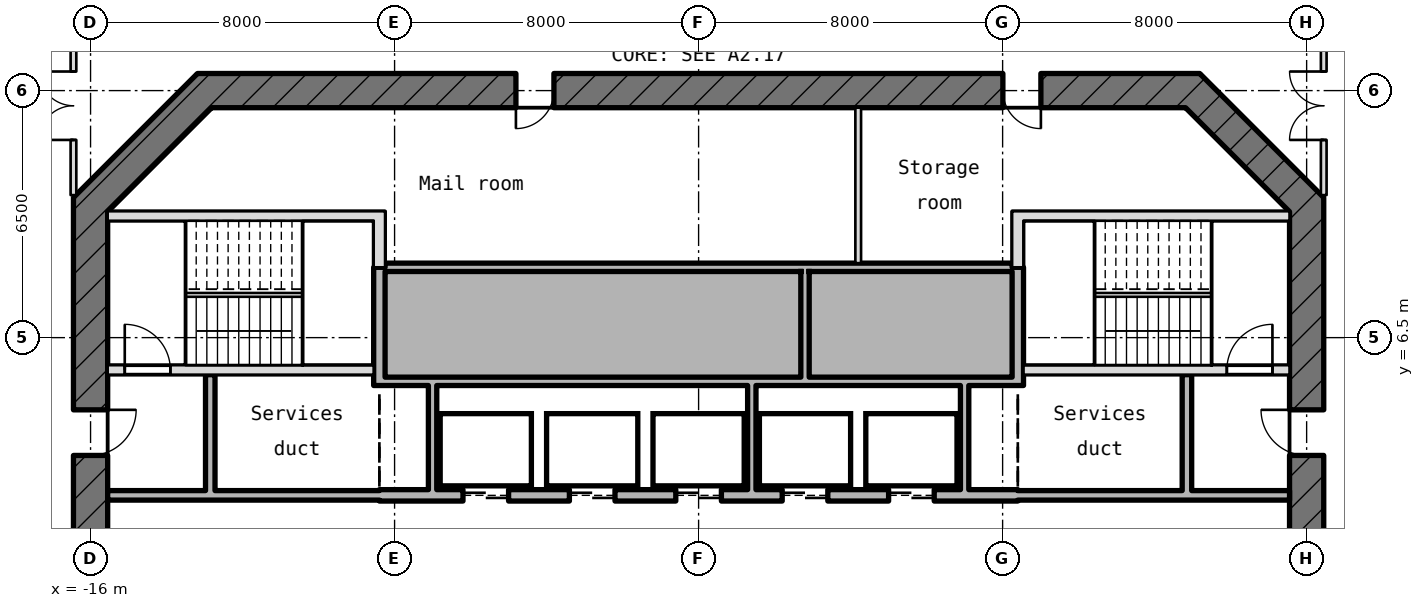
"""IFC4 building model, lengths in metres.
Left out: names, types, materials, properties, quantities, classifications, styles, units other than length and angle.
Written with IfcOpenShell. Run it as: python <this file> out.ifc"""

import sys

from ifc_helpers import new_model, si_unit, direction, frame, frame_2d, origin, place, context, subcontext, project, spatial, rectangle, extrude, element, fill, save


model = new_model("IFC4")
c1 = context("Model", 3, precision=1e-05, world=origin(), true_north=direction((0.0, 1.0)))
c2 = subcontext(c1, "Body", "Model", "MODEL_VIEW")
j1 = project(units=[si_unit("LENGTHUNIT", "METRE"), si_unit("PLANEANGLEUNIT", "RADIAN")], contexts=[c1])
p1 = place(None, origin())
s1 = spatial("IfcSite", under=j1, at=p1, CompositionType="ELEMENT")
p2 = place(p1, origin())
s2 = spatial("IfcBuilding", under=s1, at=p2, CompositionType="ELEMENT")
p3 = place(p2, frame((0.0, 0.0, 173.5)))
s3 = spatial("IfcBuildingStorey", under=s2, at=p3, CompositionType="ELEMENT", Elevation=173.5)
p4 = place(p3, frame((16.0, -10.186, -0.18), z_axis=(0.0, 0.0, 1.0), x_axis=(0.0, 1.0, 0.0)))
e1 = element("IfcWall", 1, at=p4, inside=s3, PredefinedType="SHEAR", context=c2, shape_type="SweptSolid", body=[
    extrude(rectangle(XDim=20.373, YDim=0.9, at=frame_2d((10.186, 0.0))), origin(), (0.0, 0.0, 1.0), 4.15),
])
p5 = place(p4, frame((8.986, 0.0, 0.18)))
e2 = element("IfcOpeningElement", 2, at=p5, cuts=e1, PredefinedType="OPENING", context=c2, shape_type="SweptSolid", body=[
    extrude(rectangle(XDim=2.4, YDim=2.1, at=frame_2d((1.2, 1.05))), frame((0.0, 0.46, 0.0), z_axis=(0.0, -1.0, 0.0), x_axis=(1.0, 0.0, 0.0)), (0.0, 0.0, 1.0), 0.92),
])
p6 = place(p4, frame((13.586, 0.0, 0.18)))
e3 = element("IfcOpeningElement", 3, at=p6, cuts=e1, PredefinedType="OPENING", context=c2, shape_type="SweptSolid", body=[
    extrude(rectangle(XDim=1.2, YDim=2.1, at=frame_2d((0.6, 1.05))), frame((0.0, 0.46, 0.0), z_axis=(0.0, -1.0, 0.0), x_axis=(1.0, 0.0, 0.0)), (0.0, 0.0, 1.0), 0.92),
])
p7 = place(p4, frame((2.4, 0.0, 0.18)))
e4 = element("IfcOpeningElement", 4, at=p7, cuts=e1, PredefinedType="OPENING", context=c2, shape_type="SweptSolid", body=[
    extrude(rectangle(XDim=1.2, YDim=2.1, at=frame_2d((0.6, 1.05))), frame((0.0, 0.46, 0.0), z_axis=(0.0, -1.0, 0.0), x_axis=(1.0, 0.0, 0.0)), (0.0, 0.0, 1.0), 0.92),
])
p8 = place(p3, frame((16.132, 9.868, -0.18), z_axis=(0.0, 0.0, 1.0), x_axis=(-0.707106781187, 0.707106781187, 0.0)))
e5 = element("IfcWall", 5, at=p8, inside=s3, PredefinedType="SHEAR", context=c2, shape_type="SweptSolid", body=[
    extrude(rectangle(XDim=4.615, YDim=0.9, at=frame_2d((2.308, 0.0))), origin(), (0.0, 0.0, 1.0), 4.15),
])
p9 = place(p3, frame((13.186, 13.0, -0.18), z_axis=(0.0, 0.0, 1.0), x_axis=(-1.0, 0.0, 0.0)))
e6 = element("IfcWall", 6, at=p9, inside=s3, PredefinedType="SHEAR", context=c2, shape_type="SweptSolid", body=[
    extrude(rectangle(XDim=26.373, YDim=0.9, at=frame_2d((13.186, 0.0))), origin(), (0.0, 0.0, 1.0), 4.15),
])
p10 = place(p9, frame((16.993, 0.0, 0.18)))
e7 = element("IfcOpeningElement", 7, at=p10, cuts=e6, PredefinedType="OPENING", context=c2, shape_type="SweptSolid", body=[
    extrude(rectangle(XDim=1.0, YDim=2.1, at=frame_2d((0.5, 1.05))), frame((0.0, 0.46, 0.0), z_axis=(0.0, -1.0, 0.0), x_axis=(1.0, 0.0, 0.0)), (0.0, 0.0, 1.0), 0.92),
])
p11 = place(p9, frame((4.179, 0.0, 0.18)))
e8 = element("IfcOpeningElement", 8, at=p11, cuts=e6, PredefinedType="OPENING", context=c2, shape_type="SweptSolid", body=[
    extrude(rectangle(XDim=1.0, YDim=2.1, at=frame_2d((0.5, 1.05))), frame((0.0, 0.46, 0.0), z_axis=(0.0, -1.0, 0.0), x_axis=(1.0, 0.0, 0.0)), (0.0, 0.0, 1.0), 0.92),
])
p12 = place(p3, frame((-12.868, 13.132, -0.18), z_axis=(0.0, 0.0, 1.0), x_axis=(-0.707106781187, -0.707106781187, 0.0)))
e9 = element("IfcWall", 9, at=p12, inside=s3, PredefinedType="SHEAR", context=c2, shape_type="SweptSolid", body=[
    extrude(rectangle(XDim=4.615, YDim=0.9, at=frame_2d((2.308, 0.0))), origin(), (0.0, 0.0, 1.0), 4.15),
])
p13 = place(p3, frame((-16.0, 10.186, -0.18), z_axis=(0.0, 0.0, 1.0), x_axis=(0.0, -1.0, 0.0)))
e10 = element("IfcWall", 10, at=p13, inside=s3, PredefinedType="SHEAR", context=c2, shape_type="SweptSolid", body=[
    extrude(rectangle(XDim=20.373, YDim=0.9, at=frame_2d((10.186, 0.0))), origin(), (0.0, 0.0, 1.0), 4.15),
])
p14 = place(p13, frame((8.986, 0.0, 0.18)))
e11 = element("IfcOpeningElement", 11, at=p14, cuts=e10, PredefinedType="OPENING", context=c2, shape_type="SweptSolid", body=[
    extrude(rectangle(XDim=2.4, YDim=2.1, at=frame_2d((1.2, 1.05))), frame((0.0, 0.46, 0.0), z_axis=(0.0, -1.0, 0.0), x_axis=(1.0, 0.0, 0.0)), (0.0, 0.0, 1.0), 0.92),
])
p15 = place(p13, frame((5.586, 0.0, 0.18)))
e12 = element("IfcOpeningElement", 12, at=p15, cuts=e10, PredefinedType="OPENING", context=c2, shape_type="SweptSolid", body=[
    extrude(rectangle(XDim=1.2, YDim=2.1, at=frame_2d((0.6, 1.05))), frame((0.0, 0.46, 0.0), z_axis=(0.0, -1.0, 0.0), x_axis=(1.0, 0.0, 0.0)), (0.0, 0.0, 1.0), 0.92),
])
p16 = place(p3, frame((-15.55, 2.35, 0.0), z_axis=(0.0, 0.0, 1.0), x_axis=(1.0, 0.0, 0.0)))
e13 = element("IfcWall", 13, at=p16, inside=s3, PredefinedType="STANDARD", context=c2, shape_type="SweptSolid", body=[
    extrude(rectangle(XDim=7.15, YDim=0.25, at=frame_2d((3.575, 0.0))), origin(), (0.0, 0.0, 1.0), 3.97),
])
p17 = place(p3, frame((-8.4, 2.35, -0.18), z_axis=(0.0, 0.0, 1.0), x_axis=(1.0, 0.0, 0.0)))
e14 = element("IfcWall", 14, at=p17, inside=s3, PredefinedType="SHEAR", context=c2, shape_type="SweptSolid", body=[
    extrude(rectangle(XDim=16.8, YDim=0.3, at=frame_2d((8.4, 0.0))), origin(), (0.0, 0.0, 1.0), 4.15),
])
p18 = place(p17, frame((2.2, 0.0, 0.18)))
e15 = element("IfcOpeningElement", 15, at=p18, cuts=e14, PredefinedType="OPENING", context=c2, shape_type="SweptSolid", body=[
    extrude(rectangle(XDim=1.2, YDim=2.1, at=frame_2d((0.6, 1.05))), frame((0.0, 0.16, 0.0), z_axis=(0.0, -1.0, 0.0), x_axis=(1.0, 0.0, 0.0)), (0.0, 0.0, 1.0), 0.32),
])
p19 = place(p17, frame((5.0, 0.0, 0.18)))
e16 = element("IfcOpeningElement", 16, at=p19, cuts=e14, PredefinedType="OPENING", context=c2, shape_type="SweptSolid", body=[
    extrude(rectangle(XDim=1.2, YDim=2.1, at=frame_2d((0.6, 1.05))), frame((0.0, 0.16, 0.0), z_axis=(0.0, -1.0, 0.0), x_axis=(1.0, 0.0, 0.0)), (0.0, 0.0, 1.0), 0.32),
])
p20 = place(p17, frame((7.8, 0.0, 0.18)))
e17 = element("IfcOpeningElement", 17, at=p20, cuts=e14, PredefinedType="OPENING", context=c2, shape_type="SweptSolid", body=[
    extrude(rectangle(XDim=1.2, YDim=2.1, at=frame_2d((0.6, 1.05))), frame((0.0, 0.16, 0.0), z_axis=(0.0, -1.0, 0.0), x_axis=(1.0, 0.0, 0.0)), (0.0, 0.0, 1.0), 0.32),
])
p21 = place(p17, frame((10.6, 0.0, 0.18)))
e18 = element("IfcOpeningElement", 18, at=p21, cuts=e14, PredefinedType="OPENING", context=c2, shape_type="SweptSolid", body=[
    extrude(rectangle(XDim=1.2, YDim=2.1, at=frame_2d((0.6, 1.05))), frame((0.0, 0.16, 0.0), z_axis=(0.0, -1.0, 0.0), x_axis=(1.0, 0.0, 0.0)), (0.0, 0.0, 1.0), 0.32),
])
p22 = place(p17, frame((13.4, 0.0, 0.18)))
e19 = element("IfcOpeningElement", 19, at=p22, cuts=e14, PredefinedType="OPENING", context=c2, shape_type="SweptSolid", body=[
    extrude(rectangle(XDim=1.2, YDim=2.1, at=frame_2d((0.6, 1.05))), frame((0.0, 0.16, 0.0), z_axis=(0.0, -1.0, 0.0), x_axis=(1.0, 0.0, 0.0)), (0.0, 0.0, 1.0), 0.32),
])
p23 = place(p3, frame((8.4, 2.35, 0.0), z_axis=(0.0, 0.0, 1.0), x_axis=(1.0, 0.0, 0.0)))
e20 = element("IfcWall", 20, at=p23, inside=s3, PredefinedType="STANDARD", context=c2, shape_type="SweptSolid", body=[
    extrude(rectangle(XDim=7.15, YDim=0.25, at=frame_2d((3.575, 0.0))), origin(), (0.0, 0.0, 1.0), 3.97),
])
p24 = place(p3, frame((-8.25, 5.35, 0.0), z_axis=(0.0, 0.0, 1.0), x_axis=(1.0, 0.0, 0.0)))
e21 = element("IfcWall", 21, at=p24, inside=s3, PredefinedType="STANDARD", context=c2, shape_type="SweptSolid", body=[
    extrude(rectangle(XDim=16.5, YDim=0.22, at=frame_2d((8.25, 0.0))), origin(), (0.0, 0.0, 1.0), 3.97),
])
p25 = place(p3, frame((-15.55, 5.65, -0.18), z_axis=(0.0, 0.0, 1.0), x_axis=(1.0, 0.0, 0.0)))
e22 = element("IfcWall", 22, at=p25, inside=s3, PredefinedType="SHEAR", context=c2, shape_type="SweptSolid", body=[
    extrude(rectangle(XDim=7.0, YDim=0.25, at=frame_2d((3.5, 0.0))), origin(), (0.0, 0.0, 1.0), 4.15),
])
p26 = place(p25, frame((0.45, 0.0, 0.18)))
e23 = element("IfcOpeningElement", 23, at=p26, cuts=e22, PredefinedType="OPENING", context=c2, shape_type="SweptSolid", body=[
    extrude(rectangle(XDim=1.2, YDim=2.1, at=frame_2d((0.6, 1.05))), frame((0.0, 0.135, 0.0), z_axis=(0.0, -1.0, 0.0), x_axis=(1.0, 0.0, 0.0)), (0.0, 0.0, 1.0), 0.27),
])
p27 = place(p3, frame((8.55, 5.65, -0.18), z_axis=(0.0, 0.0, 1.0), x_axis=(1.0, 0.0, 0.0)))
e24 = element("IfcWall", 24, at=p27, inside=s3, PredefinedType="SHEAR", context=c2, shape_type="SweptSolid", body=[
    extrude(rectangle(XDim=7.0, YDim=0.25, at=frame_2d((3.5, 0.0))), origin(), (0.0, 0.0, 1.0), 4.15),
])
p28 = place(p27, frame((5.35, 0.0, 0.18)))
e25 = element("IfcOpeningElement", 25, at=p28, cuts=e24, PredefinedType="OPENING", context=c2, shape_type="SweptSolid", body=[
    extrude(rectangle(XDim=1.2, YDim=2.1, at=frame_2d((0.6, 1.05))), frame((0.0, 0.135, 0.0), z_axis=(0.0, -1.0, 0.0), x_axis=(1.0, 0.0, 0.0)), (0.0, 0.0, 1.0), 0.27),
])
p29 = place(p3, frame((-8.25, 8.35, 0.0), z_axis=(0.0, 0.0, 1.0), x_axis=(1.0, 0.0, 0.0)))
e26 = element("IfcWall", 26, at=p29, inside=s3, PredefinedType="STANDARD", context=c2, shape_type="SweptSolid", body=[
    extrude(rectangle(XDim=16.5, YDim=0.22, at=frame_2d((8.25, 0.0))), origin(), (0.0, 0.0, 1.0), 3.97),
])
for number, where, z_axis, x_axis in (
    (27, (-15.55, 9.7, -0.18), (0.0, 0.0, 1.0), (1.0, 0.0, 0.0)),
    (28, (8.55, 9.7, -0.18), (0.0, 0.0, 1.0), (1.0, 0.0, 0.0)),
):
    element("IfcWall", number, at=place(p3, frame(where, z_axis=z_axis, x_axis=x_axis)), inside=s3, PredefinedType="SHEAR", context=c2, shape_type="SweptSolid", body=[
        extrude(rectangle(XDim=7.0, YDim=0.25, at=frame_2d((3.5, 0.0))), origin(), (0.0, 0.0, 1.0), 4.15),
    ])
p30 = place(p3, frame((-12.85, 2.475, 0.0), z_axis=(0.0, 0.0, 1.0), x_axis=(0.0, 1.0, 0.0)))
e29 = element("IfcWall", 29, at=p30, inside=s3, PredefinedType="STANDARD", context=c2, shape_type="SweptSolid", body=[
    extrude(rectangle(XDim=3.05, YDim=0.25, at=frame_2d((1.525, 0.0))), origin(), (0.0, 0.0, 1.0), 3.97),
])
p31 = place(p3, frame((-8.4, 5.24, -0.18), z_axis=(0.0, 0.0, 1.0), x_axis=(0.0, 1.0, 0.0)))
e30 = element("IfcWall", 30, at=p31, inside=s3, PredefinedType="SHEAR", context=c2, shape_type="SweptSolid", body=[
    extrude(rectangle(XDim=3.11, YDim=0.3, at=frame_2d((1.555, 0.0))), origin(), (0.0, 0.0, 1.0), 4.15),
])
p32 = place(p3, frame((-8.4, 8.35, -0.18), z_axis=(0.0, 0.0, 1.0), x_axis=(0.0, 1.0, 0.0)))
e31 = element("IfcWall", 31, at=p32, inside=s3, PredefinedType="SHEAR", context=c2, shape_type="SweptSolid", body=[
    extrude(rectangle(XDim=1.475, YDim=0.3, at=frame_2d((0.737, 0.0))), origin(), (0.0, 0.0, 1.0), 4.15),
])
for number, where, z_axis, x_axis in (
    (32, (-7.0, 2.5, 0.0), (0.0, 0.0, 1.0), (0.0, 1.0, 0.0)),
    (33, (1.4, 2.5, 0.0), (0.0, 0.0, 1.0), (0.0, 1.0, 0.0)),
):
    element("IfcWall", number, at=place(p3, frame(where, z_axis=z_axis, x_axis=x_axis)), inside=s3, PredefinedType="STANDARD", context=c2, shape_type="SweptSolid", body=[
        extrude(rectangle(XDim=2.74, YDim=0.22, at=frame_2d((1.37, 0.0))), origin(), (0.0, 0.0, 1.0), 3.97),
    ])
p33 = place(p3, frame((2.8, 5.46, 0.0), z_axis=(0.0, 0.0, 1.0), x_axis=(0.0, 1.0, 0.0)))
e34 = element("IfcWall", 34, at=p33, inside=s3, PredefinedType="STANDARD", context=c2, shape_type="SweptSolid", body=[
    extrude(rectangle(XDim=2.78, YDim=0.22, at=frame_2d((1.39, 0.0))), origin(), (0.0, 0.0, 1.0), 3.97),
])
p34 = place(p3, frame((4.2, 8.46, 0.0), z_axis=(0.0, 0.0, 1.0), x_axis=(0.0, 1.0, 0.0)))
e35 = element("IfcWall", 35, at=p34, inside=s3, PredefinedType="PARTITIONING", context=c2, shape_type="SweptSolid", body=[
    extrude(rectangle(XDim=4.09, YDim=0.15, at=frame_2d((2.045, 0.0))), origin(), (0.0, 0.0, 1.0), 3.97),
])
p35 = place(p3, frame((7.0, 2.5, 0.0), z_axis=(0.0, 0.0, 1.0), x_axis=(0.0, 1.0, 0.0)))
e36 = element("IfcWall", 36, at=p35, inside=s3, PredefinedType="STANDARD", context=c2, shape_type="SweptSolid", body=[
    extrude(rectangle(XDim=2.74, YDim=0.22, at=frame_2d((1.37, 0.0))), origin(), (0.0, 0.0, 1.0), 3.97),
])
p36 = place(p3, frame((8.4, 5.24, -0.18), z_axis=(0.0, 0.0, 1.0), x_axis=(0.0, 1.0, 0.0)))
e37 = element("IfcWall", 37, at=p36, inside=s3, PredefinedType="SHEAR", context=c2, shape_type="SweptSolid", body=[
    extrude(rectangle(XDim=3.11, YDim=0.3, at=frame_2d((1.555, 0.0))), origin(), (0.0, 0.0, 1.0), 4.15),
])
p37 = place(p3, frame((8.4, 8.35, -0.18), z_axis=(0.0, 0.0, 1.0), x_axis=(0.0, 1.0, 0.0)))
e38 = element("IfcWall", 38, at=p37, inside=s3, PredefinedType="SHEAR", context=c2, shape_type="SweptSolid", body=[
    extrude(rectangle(XDim=1.475, YDim=0.3, at=frame_2d((0.737, 0.0))), origin(), (0.0, 0.0, 1.0), 4.15),
])
p38 = place(p3, frame((12.85, 2.475, 0.0), z_axis=(0.0, 0.0, 1.0), x_axis=(0.0, 1.0, 0.0)))
e39 = element("IfcWall", 39, at=p38, inside=s3, PredefinedType="STANDARD", context=c2, shape_type="SweptSolid", body=[
    extrude(rectangle(XDim=3.05, YDim=0.25, at=frame_2d((1.525, 0.0))), origin(), (0.0, 0.0, 1.0), 3.97),
])
p39 = place(p3, frame((-16.45, 10.25, 0.0), z_axis=(0.0, 0.0, 1.0), x_axis=(0.0, 1.0, 0.0)))
e40 = element("IfcWall", 40, at=p39, inside=s3, PredefinedType="PARTITIONING", context=c2, shape_type="SweptSolid", body=[
    extrude(rectangle(XDim=7.159, YDim=0.15, at=frame_2d((3.58, 0.0))), origin(), (0.0, 0.0, 1.0), 3.97),
])
p40 = place(p39, frame((1.452, 0.0, 0.0)))
e41 = element("IfcOpeningElement", 41, at=p40, cuts=e40, PredefinedType="OPENING", context=c2, shape_type="SweptSolid", body=[
    extrude(rectangle(XDim=1.8, YDim=2.1, at=frame_2d((0.9, 1.05))), frame((0.0, 0.085, 0.0), z_axis=(0.0, -1.0, 0.0), x_axis=(1.0, 0.0, 0.0)), (0.0, 0.0, 1.0), 0.17),
])
p41 = place(p3, frame((16.45, 10.25, 0.0), z_axis=(0.0, 0.0, 1.0), x_axis=(0.0, 1.0, 0.0)))
e42 = element("IfcWall", 42, at=p41, inside=s3, PredefinedType="PARTITIONING", context=c2, shape_type="SweptSolid", body=[
    extrude(rectangle(XDim=7.159, YDim=0.15, at=frame_2d((3.58, 0.0))), origin(), (0.0, 0.0, 1.0), 3.97),
])
p42 = place(p41, frame((1.452, 0.0, 0.0)))
e43 = element("IfcOpeningElement", 43, at=p42, cuts=e42, PredefinedType="OPENING", context=c2, shape_type="SweptSolid", body=[
    extrude(rectangle(XDim=1.8, YDim=2.1, at=frame_2d((0.9, 1.05))), frame((0.0, 0.085, 0.0), z_axis=(0.0, -1.0, 0.0), x_axis=(1.0, 0.0, 0.0)), (0.0, 0.0, 1.0), 0.17),
])
p43 = place(p18, origin())
e44 = element("IfcDoor", 44, at=p43, inside=s3, OperationType="DOUBLE_DOOR_SLIDING", PredefinedType="DOOR", context=c2, shape_type="SweptSolid", body=[
    extrude(rectangle(XDim=1.2, YDim=2.1, at=frame_2d((0.6, 1.05))), frame((0.0, 0.025, 0.0), z_axis=(0.0, -1.0, 0.0), x_axis=(1.0, 0.0, 0.0)), (0.0, 0.0, 1.0), 0.05),
])
fill(e15, e44)
p44 = place(p19, origin())
e45 = element("IfcDoor", 45, at=p44, inside=s3, OperationType="DOUBLE_DOOR_SLIDING", PredefinedType="DOOR", context=c2, shape_type="SweptSolid", body=[
    extrude(rectangle(XDim=1.2, YDim=2.1, at=frame_2d((0.6, 1.05))), frame((0.0, 0.025, 0.0), z_axis=(0.0, -1.0, 0.0), x_axis=(1.0, 0.0, 0.0)), (0.0, 0.0, 1.0), 0.05),
])
fill(e16, e45)
p45 = place(p20, origin())
e46 = element("IfcDoor", 46, at=p45, inside=s3, OperationType="DOUBLE_DOOR_SLIDING", PredefinedType="DOOR", context=c2, shape_type="SweptSolid", body=[
    extrude(rectangle(XDim=1.2, YDim=2.1, at=frame_2d((0.6, 1.05))), frame((0.0, 0.025, 0.0), z_axis=(0.0, -1.0, 0.0), x_axis=(1.0, 0.0, 0.0)), (0.0, 0.0, 1.0), 0.05),
])
fill(e17, e46)
p46 = place(p21, origin())
e47 = element("IfcDoor", 47, at=p46, inside=s3, OperationType="DOUBLE_DOOR_SLIDING", PredefinedType="DOOR", context=c2, shape_type="SweptSolid", body=[
    extrude(rectangle(XDim=1.2, YDim=2.1, at=frame_2d((0.6, 1.05))), frame((0.0, 0.025, 0.0), z_axis=(0.0, -1.0, 0.0), x_axis=(1.0, 0.0, 0.0)), (0.0, 0.0, 1.0), 0.05),
])
fill(e18, e47)
p47 = place(p22, origin())
e48 = element("IfcDoor", 48, at=p47, inside=s3, OperationType="DOUBLE_DOOR_SLIDING", PredefinedType="DOOR", context=c2, shape_type="SweptSolid", body=[
    extrude(rectangle(XDim=1.2, YDim=2.1, at=frame_2d((0.6, 1.05))), frame((0.0, 0.025, 0.0), z_axis=(0.0, -1.0, 0.0), x_axis=(1.0, 0.0, 0.0)), (0.0, 0.0, 1.0), 0.05),
])
fill(e19, e48)
p48 = place(p26, origin())
e49 = element("IfcDoor", 49, at=p48, inside=s3, OperationType="SINGLE_SWING_RIGHT", PredefinedType="DOOR", context=c2, shape_type="SweptSolid", body=[
    extrude(rectangle(XDim=1.2, YDim=2.1, at=frame_2d((0.6, 1.05))), frame((0.0, 0.025, 0.0), z_axis=(0.0, -1.0, 0.0), x_axis=(1.0, 0.0, 0.0)), (0.0, 0.0, 1.0), 0.05),
])
fill(e23, e49)
p49 = place(p28, origin())
e50 = element("IfcDoor", 50, at=p49, inside=s3, OperationType="SINGLE_SWING_RIGHT", PredefinedType="DOOR", context=c2, shape_type="SweptSolid", body=[
    extrude(rectangle(XDim=1.2, YDim=2.1, at=frame_2d((0.6, 1.05))), frame((0.0, 0.025, 0.0), z_axis=(0.0, -1.0, 0.0), x_axis=(1.0, 0.0, 0.0)), (0.0, 0.0, 1.0), 0.05),
])
fill(e25, e50)
p50 = place(p15, origin())
e51 = element("IfcDoor", 51, at=p50, inside=s3, OperationType="SINGLE_SWING_RIGHT", PredefinedType="DOOR", context=c2, shape_type="SweptSolid", body=[
    extrude(rectangle(XDim=1.2, YDim=2.1, at=frame_2d((0.6, 1.05))), frame((0.0, 0.025, 0.0), z_axis=(0.0, -1.0, 0.0), x_axis=(1.0, 0.0, 0.0)), (0.0, 0.0, 1.0), 0.05),
])
fill(e12, e51)
p51 = place(p6, origin())
e52 = element("IfcDoor", 52, at=p51, inside=s3, OperationType="SINGLE_SWING_RIGHT", PredefinedType="DOOR", context=c2, shape_type="SweptSolid", body=[
    extrude(rectangle(XDim=1.2, YDim=2.1, at=frame_2d((0.6, 1.05))), frame((0.0, 0.025, 0.0), z_axis=(0.0, -1.0, 0.0), x_axis=(1.0, 0.0, 0.0)), (0.0, 0.0, 1.0), 0.05),
])
fill(e3, e52)
p52 = place(p10, origin())
e53 = element("IfcDoor", 53, at=p52, inside=s3, OperationType="SINGLE_SWING_RIGHT", PredefinedType="DOOR", context=c2, shape_type="SweptSolid", body=[
    extrude(rectangle(XDim=1.0, YDim=2.1, at=frame_2d((0.5, 1.05))), frame((0.0, 0.025, 0.0), z_axis=(0.0, -1.0, 0.0), x_axis=(1.0, 0.0, 0.0)), (0.0, 0.0, 1.0), 0.05),
])
fill(e7, e53)
p53 = place(p11, origin())
e54 = element("IfcDoor", 54, at=p53, inside=s3, OperationType="SINGLE_SWING_RIGHT", PredefinedType="DOOR", context=c2, shape_type="SweptSolid", body=[
    extrude(rectangle(XDim=1.0, YDim=2.1, at=frame_2d((0.5, 1.05))), frame((0.0, 0.025, 0.0), z_axis=(0.0, -1.0, 0.0), x_axis=(1.0, 0.0, 0.0)), (0.0, 0.0, 1.0), 0.05),
])
fill(e8, e54)
p54 = place(p40, origin())
e55 = element("IfcDoor", 55, at=p54, inside=s3, OperationType="DOUBLE_DOOR_SINGLE_SWING", PredefinedType="DOOR", context=c2, shape_type="SweptSolid", body=[
    extrude(rectangle(XDim=1.8, YDim=2.1, at=frame_2d((0.9, 1.05))), frame((0.0, 0.025, 0.0), z_axis=(0.0, -1.0, 0.0), x_axis=(1.0, 0.0, 0.0)), (0.0, 0.0, 1.0), 0.05),
])
fill(e41, e55)
p55 = place(p42, origin())
e56 = element("IfcDoor", 56, at=p55, inside=s3, OperationType="DOUBLE_DOOR_SINGLE_SWING", PredefinedType="DOOR", context=c2, shape_type="SweptSolid", body=[
    extrude(rectangle(XDim=1.8, YDim=2.1, at=frame_2d((0.9, 1.05))), frame((0.0, 0.025, 0.0), z_axis=(0.0, -1.0, 0.0), x_axis=(1.0, 0.0, 0.0)), (0.0, 0.0, 1.0), 0.05),
])
fill(e43, e56)
save(model, sys.argv[1])
